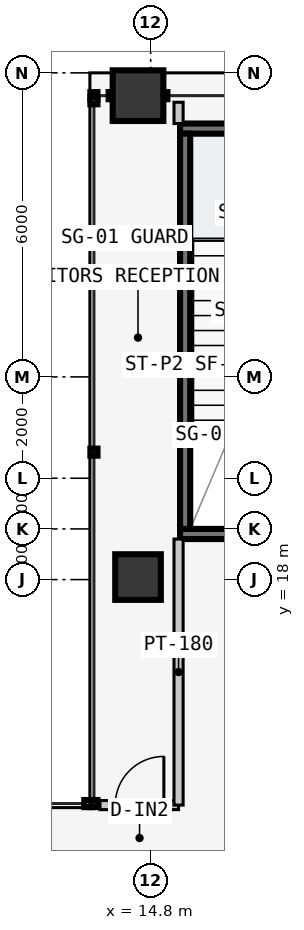
"""IFC4 building model, lengths in metres.
Left out: names, types, materials, properties, quantities, classifications, styles, units other than length and angle.
Written with IfcOpenShell. Run it as: python <this file> out.ifc"""

import sys

from ifc_helpers import new_model, si_unit, direction, frame, frame_2d, origin, origin_2d, place, context, subcontext, project, spatial, rectangle, hollow_rectangle, extrude, element, fill, save


model = new_model("IFC4")
c1 = context("Model", 3, precision=1e-05, world=origin(), true_north=direction((0.0, 1.0)))
c2 = subcontext(c1, "Body", "Model", "MODEL_VIEW")
j1 = project(units=[si_unit("LENGTHUNIT", "METRE"), si_unit("PLANEANGLEUNIT", "RADIAN")], contexts=[c1])
p1 = place(None, origin())
s1 = spatial("IfcSite", under=j1, at=p1, CompositionType="ELEMENT")
p2 = place(p1, origin())
s2 = spatial("IfcBuilding", under=s1, at=p2, CompositionType="ELEMENT")
p3 = place(p2, frame((0.0, 0.0, 9.6)))
s3 = spatial("IfcBuildingStorey", under=s2, at=p3, CompositionType="ELEMENT", Elevation=9.6)
p4 = place(p3, frame((15.38, 18.9, -0.22), z_axis=(0.0, 0.0, 1.0), x_axis=(1.0, 0.0, 0.0)))
e1 = element("IfcWall", 1, at=p4, inside=s3, PredefinedType="SOLIDWALL", context=c2, shape_type="SweptSolid", body=[
    extrude(rectangle(XDim=3.72, YDim=0.2, at=frame_2d((1.86, 0.0))), origin(), (0.0, 0.0, 1.0), 4.8),
])
p5 = place(p4, frame((1.3, 0.0, 0.22)))
e2 = element("IfcOpeningElement", 2, at=p5, cuts=e1, PredefinedType="OPENING", context=c2, shape_type="SweptSolid", body=[
    extrude(rectangle(XDim=1.12, YDim=2.18, at=frame_2d((0.56, 1.09))), frame((0.0, 0.11, 0.0), z_axis=(0.0, -1.0, 0.0), x_axis=(1.0, 0.0, 0.0)), (0.0, 0.0, 1.0), 0.22),
])
p6 = place(p3, frame((15.38, 26.9, -0.22), z_axis=(0.0, 0.0, 1.0), x_axis=(1.0, 0.0, 0.0)))
e3 = element("IfcWall", 3, at=p6, inside=s3, PredefinedType="SOLIDWALL", context=c2, shape_type="SweptSolid", body=[
    extrude(rectangle(XDim=3.72, YDim=0.2, at=frame_2d((1.86, 0.0))), origin(), (0.0, 0.0, 1.0), 4.8),
])
p7 = place(p3, frame((15.48, 19.0, -0.22), z_axis=(0.0, 0.0, 1.0), x_axis=(0.0, 1.0, 0.0)))
e4 = element("IfcWall", 4, at=p7, inside=s3, PredefinedType="SOLIDWALL", context=c2, shape_type="SweptSolid", body=[
    extrude(rectangle(XDim=7.8, YDim=0.2, at=frame_2d((3.9, 0.0))), origin(), (0.0, 0.0, 1.0), 4.8),
])
p8 = place(p3, frame((14.55, 18.05, 0.0), z_axis=(0.0, 0.0, 1.0), x_axis=(1.0, 0.0, 0.0)))
e5 = element("IfcColumn", 5, at=p8, inside=s3, PredefinedType="COLUMN", context=c2, shape_type="SweptSolid", body=[
    extrude(hollow_rectangle(XDim=0.9, YDim=0.9, WallThickness=0.045, at=origin_2d()), origin(), (0.0, 0.0, 1.0), 4.8),
])
p9 = place(p3, frame((14.55, 27.55, 0.0), z_axis=(0.0, 0.0, 1.0), x_axis=(1.0, 0.0, 0.0)))
e6 = element("IfcColumn", 6, at=p9, inside=s3, PredefinedType="COLUMN", context=c2, shape_type="SweptSolid", body=[
    extrude(hollow_rectangle(XDim=1.0, YDim=1.0, WallThickness=0.05, at=origin_2d()), origin(), (0.0, 0.0, 1.0), 4.8),
])
p10 = place(p3, frame((13.8, 13.55, 0.0), z_axis=(0.0, 0.0, 1.0), x_axis=(1.0, 0.0, 0.0)))
e7 = element("IfcWall", 7, at=p10, inside=s3, PredefinedType="PARTITIONING", context=c2, shape_type="SweptSolid", body=[
    extrude(rectangle(XDim=1.55, YDim=0.18, at=frame_2d((0.775, 0.0))), origin(), (0.0, 0.0, 1.0), 4.58),
])
p11 = place(p10, frame((0.3, 0.0, 0.0)))
e8 = element("IfcOpeningElement", 8, at=p11, cuts=e7, PredefinedType="OPENING", context=c2, shape_type="SweptSolid", body=[
    extrude(rectangle(XDim=0.96, YDim=2.18, at=frame_2d((0.48, 1.09))), frame((0.0, 0.1, 0.0), z_axis=(0.0, -1.0, 0.0), x_axis=(1.0, 0.0, 0.0)), (0.0, 0.0, 1.0), 0.2),
])
p12 = place(p3, frame((15.35, 13.55, 0.0), z_axis=(0.0, 0.0, 1.0), x_axis=(0.0, 1.0, 0.0)))
e9 = element("IfcWall", 9, at=p12, inside=s3, PredefinedType="PARTITIONING", context=c2, shape_type="SweptSolid", body=[
    extrude(rectangle(XDim=5.25, YDim=0.18, at=frame_2d((2.625, 0.0))), origin(), (0.0, 0.0, 1.0), 4.58),
])
p13 = place(p3, frame((15.35, 27.0, 0.0), z_axis=(0.0, 0.0, 1.0), x_axis=(0.0, 1.0, 0.0)))
e10 = element("IfcWall", 10, at=p13, inside=s3, PredefinedType="PARTITIONING", context=c2, shape_type="SweptSolid", body=[
    extrude(rectangle(XDim=0.42, YDim=0.18, at=frame_2d((0.21, 0.0))), origin(), (0.0, 0.0, 1.0), 4.58),
])
p14 = place(p11, origin())
e11 = element("IfcDoor", 11, at=p14, inside=s3, OperationType="SINGLE_SWING_RIGHT", PredefinedType="DOOR", context=c2, shape_type="SweptSolid", body=[
    extrude(rectangle(XDim=0.96, YDim=2.18, at=frame_2d((0.48, 1.09))), frame((0.0, 0.025, 0.0), z_axis=(0.0, -1.0, 0.0), x_axis=(1.0, 0.0, 0.0)), (0.0, 0.0, 1.0), 0.05),
])
fill(e8, e11)
save(model, sys.argv[1])
